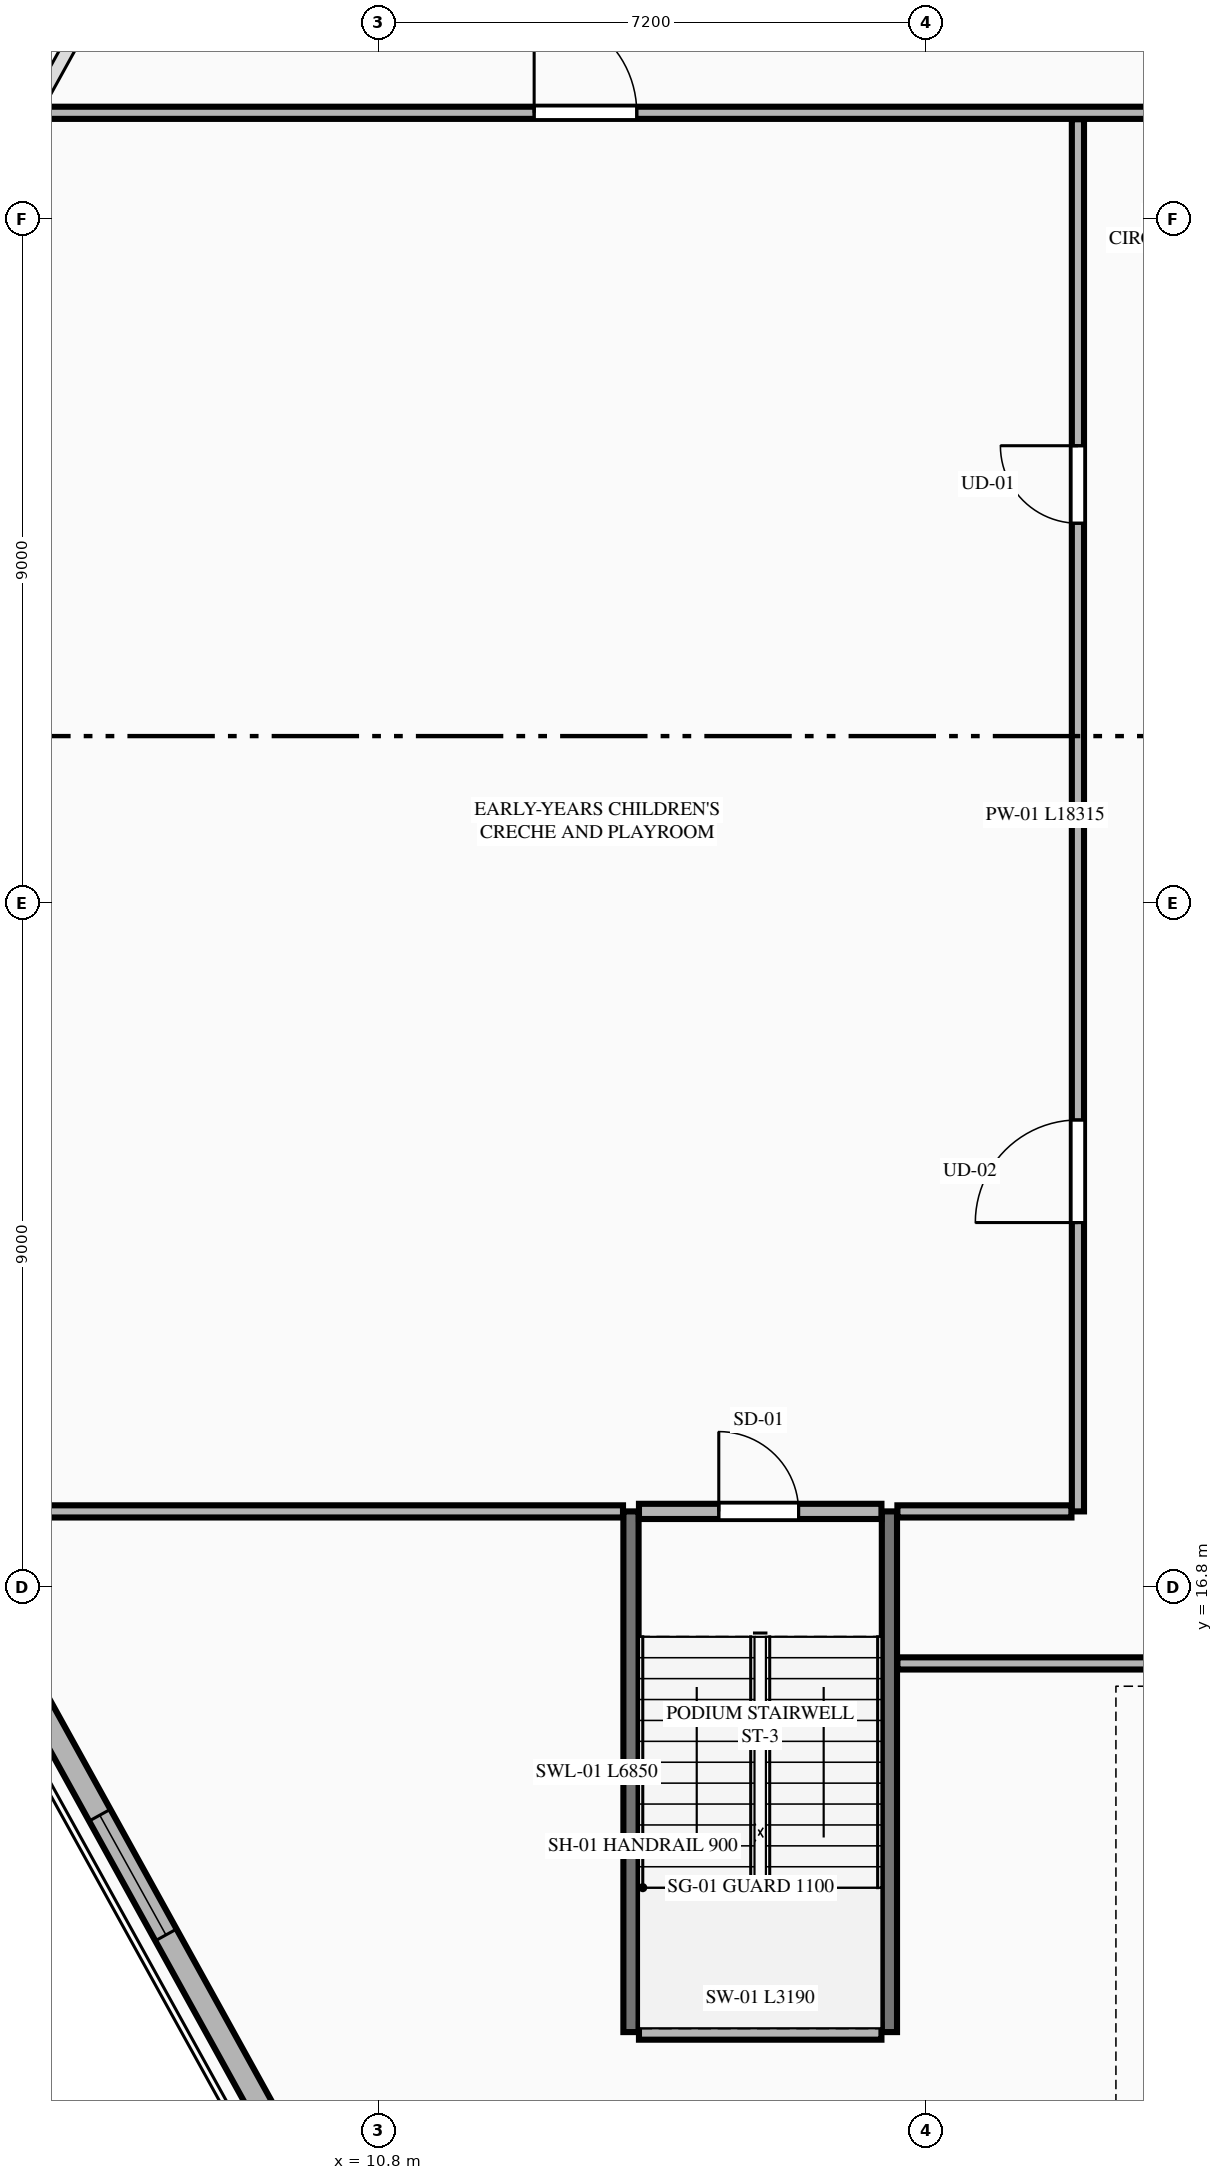
"""IFC4 building model, lengths in metres.
Left out: names, types, materials, properties, quantities, classifications, styles, units other than length and angle.
Written with IfcOpenShell. Run it as: python <this file> out.ifc"""

import sys

from ifc_helpers import new_model, si_unit, direction, frame, frame_2d, origin, place, context, subcontext, project, spatial, rectangle, extrude, element, fill, save


model = new_model("IFC4")
c1 = context("Model", 3, precision=1e-05, world=origin(), true_north=direction((0.0, 1.0)))
c2 = subcontext(c1, "Body", "Model", "MODEL_VIEW")
j1 = project(units=[si_unit("LENGTHUNIT", "METRE"), si_unit("PLANEANGLEUNIT", "RADIAN")], contexts=[c1])
p1 = place(None, origin())
s1 = spatial("IfcSite", under=j1, at=p1, CompositionType="ELEMENT")
p2 = place(p1, origin())
s2 = spatial("IfcBuilding", under=s1, at=p2, CompositionType="ELEMENT")
p3 = place(p2, frame((0.0, 0.0, 15.0)))
s3 = spatial("IfcBuildingStorey", under=s2, at=p3, CompositionType="ELEMENT", Elevation=15.0)
for number, where, z_axis, x_axis in (
    (1, (14.12, 10.95, 0.0), (0.0, 0.0, 1.0), (0.0, 1.0, 0.0)),
    (2, (17.52, 10.95, 0.0), (0.0, 0.0, 1.0), (0.0, 1.0, 0.0)),
):
    element("IfcWall", number, at=place(p3, frame(where, z_axis=z_axis, x_axis=x_axis)), inside=s3, PredefinedType="SHEAR", context=c2, shape_type="SweptSolid", body=[
        extrude(rectangle(XDim=6.85, YDim=0.2, at=frame_2d((3.425, 0.0))), origin(), (0.0, 0.0, 1.0), 4.5),
    ])
p4 = place(p3, frame((14.225, 10.95, 0.0), z_axis=(0.0, 0.0, 1.0), x_axis=(1.0, 0.0, 0.0)))
e3 = element("IfcWall", 3, at=p4, inside=s3, PredefinedType="PLUMBINGWALL", context=c2, shape_type="SweptSolid", body=[
    extrude(rectangle(XDim=3.19, YDim=0.2, at=frame_2d((1.595, 0.0))), origin(), (0.0, 0.0, 1.0), 4.22),
])
p5 = place(p3, frame((14.225, 17.8, 0.0), z_axis=(0.0, 0.0, 1.0), x_axis=(1.0, 0.0, 0.0)))
e4 = element("IfcWall", 4, at=p5, inside=s3, PredefinedType="PLUMBINGWALL", context=c2, shape_type="SweptSolid", body=[
    extrude(rectangle(XDim=3.19, YDim=0.2, at=frame_2d((1.595, 0.0))), origin(), (0.0, 0.0, 1.0), 4.22),
])
p6 = place(p5, frame((1.05, 0.0, 0.0)))
e5 = element("IfcOpeningElement", 5, at=p6, cuts=e4, PredefinedType="OPENING", context=c2, shape_type="SweptSolid", body=[
    extrude(rectangle(XDim=1.05, YDim=2.15, at=frame_2d((0.525, 1.075))), frame((0.0, 0.11, 0.0), z_axis=(0.0, -1.0, 0.0), x_axis=(1.0, 0.0, 0.0)), (0.0, 0.0, 1.0), 0.22),
])
p7 = place(p3, frame((17.625, 15.8, 0.0), z_axis=(0.0, 0.0, 1.0), x_axis=(1.0, 0.0, 0.0)))
e6 = element("IfcWall", 6, at=p7, inside=s3, PredefinedType="PARTITIONING", context=c2, shape_type="SweptSolid", body=[
    extrude(rectangle(XDim=29.59, YDim=0.16, at=frame_2d((14.795, 0.0))), origin(), (0.0, 0.0, 1.0), 4.22),
])
p8 = place(p7, frame((3.5, 0.0, 0.0)))
e7 = element("IfcOpeningElement", 7, at=p8, cuts=e6, PredefinedType="OPENING", context=c2, shape_type="SweptSolid", body=[
    extrude(rectangle(XDim=1.35, YDim=2.35, at=frame_2d((0.675, 1.175))), frame((0.0, 0.09, 0.0), z_axis=(0.0, -1.0, 0.0), x_axis=(1.0, 0.0, 0.0)), (0.0, 0.0, 1.0), 0.18),
])
p9 = place(p7, frame((24.5, 0.0, 0.0)))
e8 = element("IfcOpeningElement", 8, at=p9, cuts=e6, PredefinedType="OPENING", context=c2, shape_type="SweptSolid", body=[
    extrude(rectangle(XDim=1.35, YDim=2.35, at=frame_2d((0.675, 1.175))), frame((0.0, 0.09, 0.0), z_axis=(0.0, -1.0, 0.0), x_axis=(1.0, 0.0, 0.0)), (0.0, 0.0, 1.0), 0.18),
])
p10 = place(p3, frame((17.625, 17.8, 0.0), z_axis=(0.0, 0.0, 1.0), x_axis=(1.0, 0.0, 0.0)))
e9 = element("IfcWall", 9, at=p10, inside=s3, PredefinedType="PARTITIONING", context=c2, shape_type="SweptSolid", body=[
    extrude(rectangle(XDim=2.29, YDim=0.16, at=frame_2d((1.145, 0.0))), origin(), (0.0, 0.0, 1.0), 4.22),
])
p11 = place(p3, frame((5.02, 17.8, 0.0), z_axis=(0.0, 0.0, 1.0), x_axis=(1.0, 0.0, 0.0)))
e10 = element("IfcWall", 10, at=p11, inside=s3, PredefinedType="PARTITIONING", context=c2, shape_type="SweptSolid", body=[
    extrude(rectangle(XDim=8.995, YDim=0.16, at=frame_2d((4.498, 0.0))), origin(), (0.0, 0.0, 1.0), 4.22),
])
p12 = place(p3, frame((20.0, 17.8, 0.0), z_axis=(0.0, 0.0, 1.0), x_axis=(0.0, 1.0, 0.0)))
e11 = element("IfcWall", 11, at=p12, inside=s3, PredefinedType="PARTITIONING", context=c2, shape_type="SweptSolid", body=[
    extrude(rectangle(XDim=18.315, YDim=0.16, at=frame_2d((9.157, 0.0))), origin(), (0.0, 0.0, 1.0), 4.22),
])
p13 = place(p12, frame((3.8, 0.0, 0.0)))
e12 = element("IfcOpeningElement", 12, at=p13, cuts=e11, PredefinedType="OPENING", context=c2, shape_type="SweptSolid", body=[
    extrude(rectangle(XDim=1.35, YDim=2.35, at=frame_2d((0.675, 1.175))), frame((0.0, 0.09, 0.0), z_axis=(0.0, -1.0, 0.0), x_axis=(1.0, 0.0, 0.0)), (0.0, 0.0, 1.0), 0.18),
])
p14 = place(p12, frame((13.0, 0.0, 0.0)))
e13 = element("IfcOpeningElement", 13, at=p14, cuts=e11, PredefinedType="OPENING", context=c2, shape_type="SweptSolid", body=[
    extrude(rectangle(XDim=1.02, YDim=2.25, at=frame_2d((0.51, 1.125))), frame((0.0, 0.09, 0.0), z_axis=(0.0, -1.0, 0.0), x_axis=(1.0, 0.0, 0.0)), (0.0, 0.0, 1.0), 0.18),
])
p15 = place(p3, frame((6.346, 36.2, 0.0), z_axis=(0.0, 0.0, 1.0), x_axis=(1.0, 0.0, 0.0)))
e14 = element("IfcWall", 14, at=p15, inside=s3, PredefinedType="PARTITIONING", context=c2, shape_type="SweptSolid", body=[
    extrude(rectangle(XDim=52.108, YDim=0.16, at=frame_2d((26.054, 0.0))), origin(), (0.0, 0.0, 1.0), 4.22),
])
p16 = place(p15, frame((6.5, 0.0, 0.0)))
e15 = element("IfcOpeningElement", 15, at=p16, cuts=e14, PredefinedType="OPENING", context=c2, shape_type="SweptSolid", body=[
    extrude(rectangle(XDim=1.35, YDim=2.35, at=frame_2d((0.675, 1.175))), frame((0.0, 0.09, 0.0), z_axis=(0.0, -1.0, 0.0), x_axis=(1.0, 0.0, 0.0)), (0.0, 0.0, 1.0), 0.18),
])
p17 = place(p15, frame((26.5, 0.0, 0.0)))
e16 = element("IfcOpeningElement", 16, at=p17, cuts=e14, PredefinedType="OPENING", context=c2, shape_type="SweptSolid", body=[
    extrude(rectangle(XDim=1.35, YDim=2.35, at=frame_2d((0.675, 1.175))), frame((0.0, 0.09, 0.0), z_axis=(0.0, -1.0, 0.0), x_axis=(1.0, 0.0, 0.0)), (0.0, 0.0, 1.0), 0.18),
])
p18 = place(p3, frame((4.419, 18.711, 0.0), z_axis=(0.0, 0.0, 1.0), x_axis=(0.483698591046, -0.875234638837, 0.0)))
e17 = element("IfcWall", 17, at=p18, inside=s3, PredefinedType="STANDARD", context=c2, shape_type="SweptSolid", body=[
    extrude(rectangle(XDim=13.015, YDim=0.32, at=frame_2d((6.507, 0.0))), origin(), (0.0, 0.0, 1.0), 4.22),
])
p19 = place(p18, frame((5.607, 0.0, 0.75)))
e18 = element("IfcOpeningElement", 18, at=p19, cuts=e17, PredefinedType="OPENING", context=c2, shape_type="SweptSolid", body=[
    extrude(rectangle(XDim=1.8, YDim=2.4, at=frame_2d((0.9, 1.2))), frame((0.0, 0.17, 0.0), z_axis=(0.0, -1.0, 0.0), x_axis=(1.0, 0.0, 0.0)), (0.0, 0.0, 1.0), 0.34),
])
p20 = place(p6, origin())
e19 = element("IfcDoor", 19, at=p20, inside=s3, OperationType="SINGLE_SWING_LEFT", PredefinedType="DOOR", context=c2, shape_type="SweptSolid", body=[
    extrude(rectangle(XDim=1.05, YDim=2.15, at=frame_2d((0.525, 1.075))), frame((0.0, 0.025, 0.0), z_axis=(0.0, -1.0, 0.0), x_axis=(1.0, 0.0, 0.0)), (0.0, 0.0, 1.0), 0.05),
])
fill(e5, e19)
p21 = place(p13, origin())
e20 = element("IfcDoor", 20, at=p21, inside=s3, OperationType="SINGLE_SWING_LEFT", PredefinedType="DOOR", context=c2, shape_type="SweptSolid", body=[
    extrude(rectangle(XDim=1.35, YDim=2.35, at=frame_2d((0.675, 1.175))), frame((0.0, 0.025, 0.0), z_axis=(0.0, -1.0, 0.0), x_axis=(1.0, 0.0, 0.0)), (0.0, 0.0, 1.0), 0.05),
])
fill(e12, e20)
p22 = place(p14, origin())
e21 = element("IfcDoor", 21, at=p22, inside=s3, OperationType="SINGLE_SWING_RIGHT", PredefinedType="DOOR", context=c2, shape_type="SweptSolid", body=[
    extrude(rectangle(XDim=1.02, YDim=2.25, at=frame_2d((0.51, 1.125))), frame((0.0, 0.025, 0.0), z_axis=(0.0, -1.0, 0.0), x_axis=(1.0, 0.0, 0.0)), (0.0, 0.0, 1.0), 0.05),
])
fill(e13, e21)
p23 = place(p16, origin())
e22 = element("IfcDoor", 22, at=p23, inside=s3, OperationType="SINGLE_SWING_LEFT", PredefinedType="DOOR", context=c2, shape_type="SweptSolid", body=[
    extrude(rectangle(XDim=1.35, YDim=2.35, at=frame_2d((0.675, 1.175))), frame((0.0, 0.025, 0.0), z_axis=(0.0, -1.0, 0.0), x_axis=(1.0, 0.0, 0.0)), (0.0, 0.0, 1.0), 0.05),
])
fill(e15, e22)
p24 = place(p19, origin())
e23 = element("IfcWindow", 23, at=p24, inside=s3, PartitioningType="SINGLE_PANEL", PredefinedType="WINDOW", context=c2, shape_type="SweptSolid", body=[
    extrude(rectangle(XDim=1.8, YDim=2.4, at=frame_2d((0.9, 1.2))), frame((0.0, 0.03, 0.0), z_axis=(0.0, -1.0, 0.0), x_axis=(1.0, 0.0, 0.0)), (0.0, 0.0, 1.0), 0.06),
])
fill(e18, e23)
save(model, sys.argv[1])
